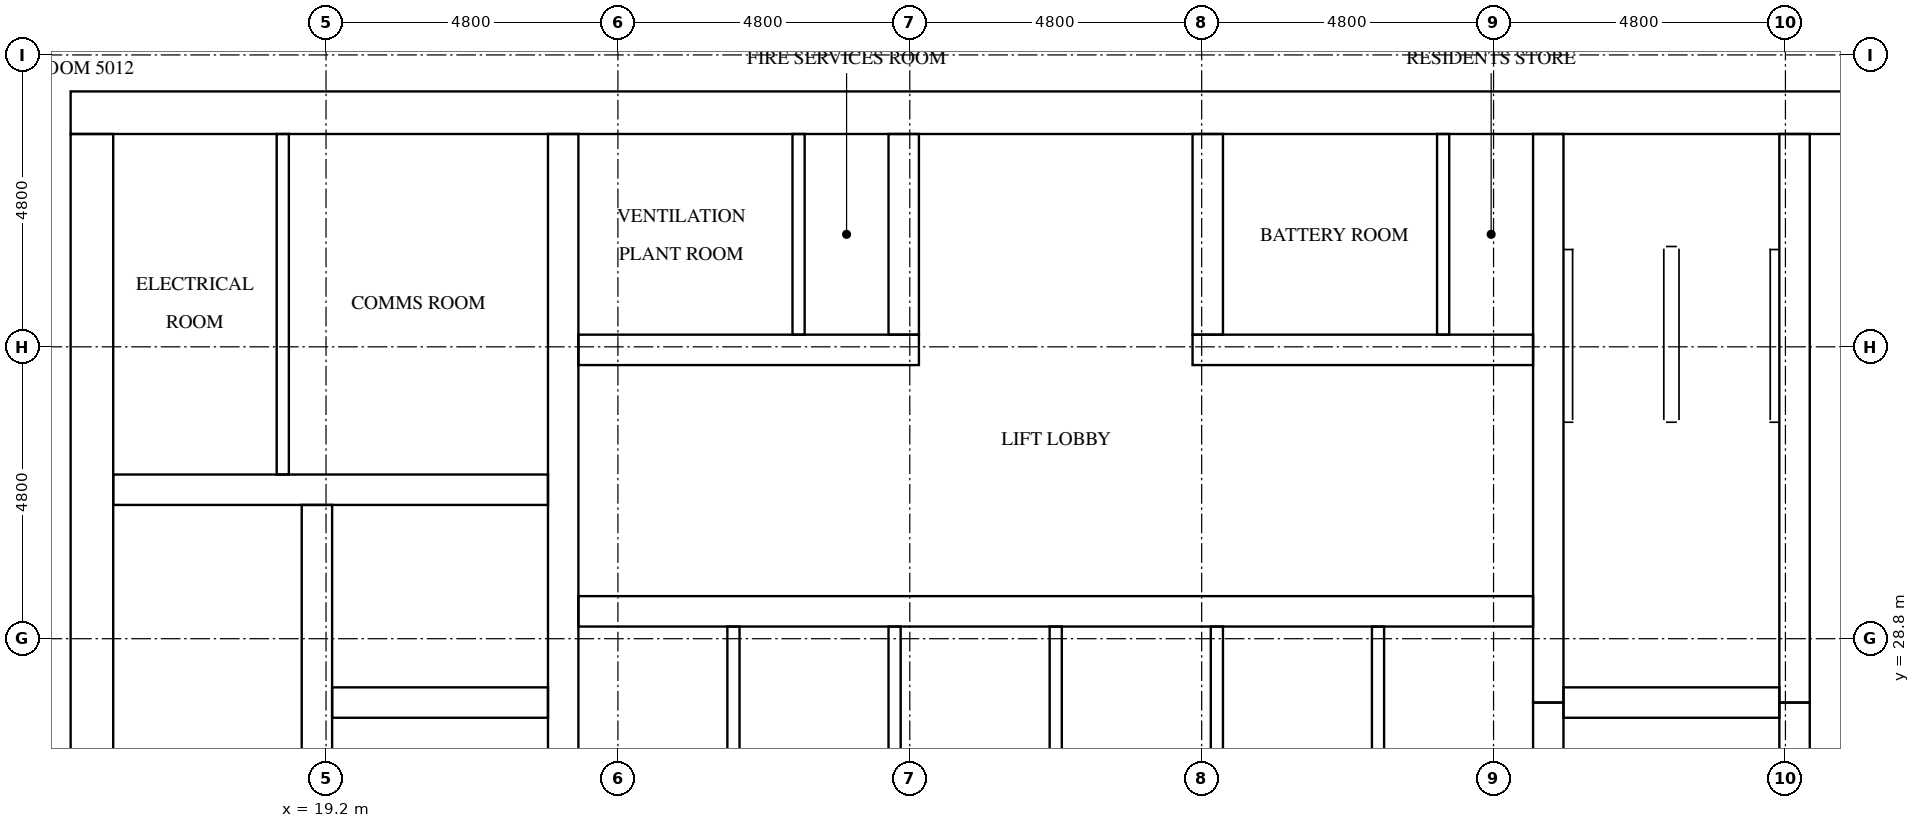
"""IFC4 building model, lengths in metres.
Left out: names, types, materials, properties, quantities, classifications, styles, units other than length and angle.
Written with IfcOpenShell. Run it as: python <this file> out.ifc"""

import sys

from ifc_helpers import new_model, si_unit, direction, frame, frame_2d, origin, place, context, subcontext, project, spatial, rectangle, extrude, element, fill, save


model = new_model("IFC4")
c1 = context("Model", 3, precision=1e-05, world=origin(), true_north=direction((0.0, 1.0)))
c2 = subcontext(c1, "Body", "Model", "MODEL_VIEW")
j1 = project(units=[si_unit("LENGTHUNIT", "METRE"), si_unit("PLANEANGLEUNIT", "RADIAN")], contexts=[c1])
p1 = place(None, origin())
s1 = spatial("IfcSite", under=j1, at=p1, CompositionType="ELEMENT")
p2 = place(p1, origin())
s2 = spatial("IfcBuilding", under=s1, at=p2, CompositionType="ELEMENT")
p3 = place(p2, frame((0.0, 0.0, 192.9)))
s3 = spatial("IfcBuildingStorey", under=s2, at=p3, CompositionType="ELEMENT", Elevation=192.9)
p4 = place(p3, frame((15.0, 37.45, 0.0), z_axis=(0.0, 0.0, 1.0), x_axis=(1.0, 0.0, 0.0)))
e1 = element("IfcWall", 1, at=p4, inside=s3, PredefinedType="SHEAR", context=c2, shape_type="SweptSolid", body=[
    extrude(rectangle(XDim=32.4, YDim=0.7, at=frame_2d((16.2, 0.0))), origin(), (0.0, 0.0, 1.0), 3.2),
])
p5 = place(p4, frame((15.3, 0.0, 0.0)))
e2 = element("IfcOpeningElement", 2, at=p5, cuts=e1, PredefinedType="OPENING", context=c2, shape_type="SweptSolid", body=[
    extrude(rectangle(XDim=1.8, YDim=2.1, at=frame_2d((0.9, 1.05))), frame((0.0, 0.36, 0.0), z_axis=(0.0, -1.0, 0.0), x_axis=(1.0, 0.0, 0.0)), (0.0, 0.0, 1.0), 0.72),
])
p6 = place(p4, frame((1.544, 0.0, 0.0)))
e3 = element("IfcOpeningElement", 3, at=p6, cuts=e1, PredefinedType="OPENING", context=c2, shape_type="SweptSolid", body=[
    extrude(rectangle(XDim=1.0, YDim=2.1, at=frame_2d((0.5, 1.05))), frame((0.0, 0.36, 0.0), z_axis=(0.0, -1.0, 0.0), x_axis=(1.0, 0.0, 0.0)), (0.0, 0.0, 1.0), 0.72),
])
p7 = place(p4, frame((5.219, 0.0, 0.0)))
e4 = element("IfcOpeningElement", 4, at=p7, cuts=e1, PredefinedType="OPENING", context=c2, shape_type="SweptSolid", body=[
    extrude(rectangle(XDim=1.0, YDim=2.1, at=frame_2d((0.5, 1.05))), frame((0.0, 0.36, 0.0), z_axis=(0.0, -1.0, 0.0), x_axis=(1.0, 0.0, 0.0)), (0.0, 0.0, 1.0), 0.72),
])
p8 = place(p3, frame((15.35, 15.7, 0.0), z_axis=(0.0, 0.0, 1.0), x_axis=(0.0, 1.0, 0.0)))
e5 = element("IfcWall", 5, at=p8, inside=s3, PredefinedType="SHEAR", context=c2, shape_type="SweptSolid", body=[
    extrude(rectangle(XDim=21.4, YDim=0.7, at=frame_2d((10.7, 0.0))), origin(), (0.0, 0.0, 1.0), 3.2),
])
p9 = place(p8, frame((5.06, 0.0, 0.0)))
e6 = element("IfcOpeningElement", 6, at=p9, cuts=e5, PredefinedType="OPENING", context=c2, shape_type="SweptSolid", body=[
    extrude(rectangle(XDim=1.2, YDim=2.1, at=frame_2d((0.6, 1.05))), frame((0.0, 0.36, 0.0), z_axis=(0.0, -1.0, 0.0), x_axis=(1.0, 0.0, 0.0)), (0.0, 0.0, 1.0), 0.72),
])
p10 = place(p3, frame((19.05, 15.7, 0.0), z_axis=(0.0, 0.0, 1.0), x_axis=(0.0, 1.0, 0.0)))
e7 = element("IfcWall", 7, at=p10, inside=s3, PredefinedType="SHEAR", context=c2, shape_type="SweptSolid", body=[
    extrude(rectangle(XDim=15.3, YDim=0.5, at=frame_2d((7.65, 0.0))), origin(), (0.0, 0.0, 1.0), 3.2),
])
p11 = place(p10, frame((9.75, 0.0, 0.0)))
e8 = element("IfcOpeningElement", 8, at=p11, cuts=e7, PredefinedType="OPENING", context=c2, shape_type="SweptSolid", body=[
    extrude(rectangle(XDim=1.1, YDim=2.1, at=frame_2d((0.55, 1.05))), frame((0.0, 0.26, 0.0), z_axis=(0.0, -1.0, 0.0), x_axis=(1.0, 0.0, 0.0)), (0.0, 0.0, 1.0), 0.52),
])
p12 = place(p10, frame((13.25, 0.0, 0.0)))
e9 = element("IfcOpeningElement", 9, at=p12, cuts=e7, PredefinedType="OPENING", context=c2, shape_type="SweptSolid", body=[
    extrude(rectangle(XDim=1.1, YDim=2.1, at=frame_2d((0.55, 1.05))), frame((0.0, 0.26, 0.0), z_axis=(0.0, -1.0, 0.0), x_axis=(1.0, 0.0, 0.0)), (0.0, 0.0, 1.0), 0.52),
])
p13 = place(p10, frame((0.5, 0.0, 0.0)))
e10 = element("IfcOpeningElement", 10, at=p13, cuts=e7, PredefinedType="OPENING", context=c2, shape_type="SweptSolid", body=[
    extrude(rectangle(XDim=1.2, YDim=2.1, at=frame_2d((0.6, 1.05))), frame((0.0, 0.26, 0.0), z_axis=(0.0, -1.0, 0.0), x_axis=(1.0, 0.0, 0.0)), (0.0, 0.0, 1.0), 0.52),
])
p14 = place(p3, frame((23.1, 15.7, 0.0), z_axis=(0.0, 0.0, 1.0), x_axis=(0.0, 1.0, 0.0)))
e11 = element("IfcWall", 11, at=p14, inside=s3, PredefinedType="SHEAR", context=c2, shape_type="SweptSolid", body=[
    extrude(rectangle(XDim=21.4, YDim=0.5, at=frame_2d((10.7, 0.0))), origin(), (0.0, 0.0, 1.0), 3.2),
])
p15 = place(p3, frame((39.3, 24.25, 0.0), z_axis=(0.0, 0.0, 1.0), x_axis=(0.0, 1.0, 0.0)))
e12 = element("IfcWall", 12, at=p15, inside=s3, PredefinedType="SHEAR", context=c2, shape_type="SweptSolid", body=[
    extrude(rectangle(XDim=3.5, YDim=0.5, at=frame_2d((1.75, 0.0))), origin(), (0.0, 0.0, 1.0), 3.2),
])
p16 = place(p3, frame((39.3, 27.75, 0.0), z_axis=(0.0, 0.0, 1.0), x_axis=(0.0, 1.0, 0.0)))
e13 = element("IfcWall", 13, at=p16, inside=s3, PredefinedType="SHEAR", context=c2, shape_type="SweptSolid", body=[
    extrude(rectangle(XDim=9.35, YDim=0.5, at=frame_2d((4.675, 0.0))), origin(), (0.0, 0.0, 1.0), 3.2),
])
p17 = place(p3, frame((43.35, 24.25, 0.0), z_axis=(0.0, 0.0, 1.0), x_axis=(0.0, 1.0, 0.0)))
e14 = element("IfcWall", 14, at=p17, inside=s3, PredefinedType="SHEAR", context=c2, shape_type="SweptSolid", body=[
    extrude(rectangle(XDim=3.5, YDim=0.5, at=frame_2d((1.75, 0.0))), origin(), (0.0, 0.0, 1.0), 3.2),
])
p18 = place(p17, frame((1.2, 0.0, 0.0)))
e15 = element("IfcOpeningElement", 15, at=p18, cuts=e14, PredefinedType="OPENING", context=c2, shape_type="SweptSolid", body=[
    extrude(rectangle(XDim=1.1, YDim=2.1, at=frame_2d((0.55, 1.05))), frame((0.0, 0.26, 0.0), z_axis=(0.0, -1.0, 0.0), x_axis=(1.0, 0.0, 0.0)), (0.0, 0.0, 1.0), 0.52),
])
p19 = place(p3, frame((43.35, 27.75, 0.0), z_axis=(0.0, 0.0, 1.0), x_axis=(0.0, 1.0, 0.0)))
e16 = element("IfcWall", 16, at=p19, inside=s3, PredefinedType="SHEAR", context=c2, shape_type="SweptSolid", body=[
    extrude(rectangle(XDim=9.35, YDim=0.5, at=frame_2d((4.675, 0.0))), origin(), (0.0, 0.0, 1.0), 3.2),
])
p20 = place(p19, frame((7.65, 0.0, 0.0)))
e17 = element("IfcOpeningElement", 17, at=p20, cuts=e16, PredefinedType="OPENING", context=c2, shape_type="SweptSolid", body=[
    extrude(rectangle(XDim=1.2, YDim=2.1, at=frame_2d((0.6, 1.05))), frame((0.0, 0.26, 0.0), z_axis=(0.0, -1.0, 0.0), x_axis=(1.0, 0.0, 0.0)), (0.0, 0.0, 1.0), 0.52),
])
p21 = place(p3, frame((19.3, 27.75, 0.0), z_axis=(0.0, 0.0, 1.0), x_axis=(1.0, 0.0, 0.0)))
e18 = element("IfcWall", 18, at=p21, inside=s3, PredefinedType="SHEAR", context=c2, shape_type="SweptSolid", body=[
    extrude(rectangle(XDim=3.55, YDim=0.5, at=frame_2d((1.775, 0.0))), origin(), (0.0, 0.0, 1.0), 3.2),
])
p22 = place(p3, frame((15.7, 31.25, 0.0), z_axis=(0.0, 0.0, 1.0), x_axis=(1.0, 0.0, 0.0)))
e19 = element("IfcWall", 19, at=p22, inside=s3, PredefinedType="SHEAR", context=c2, shape_type="SweptSolid", body=[
    extrude(rectangle(XDim=7.15, YDim=0.5, at=frame_2d((3.575, 0.0))), origin(), (0.0, 0.0, 1.0), 3.2),
])
p23 = place(p3, frame((39.55, 27.75, 0.0), z_axis=(0.0, 0.0, 1.0), x_axis=(1.0, 0.0, 0.0)))
e20 = element("IfcWall", 20, at=p23, inside=s3, PredefinedType="SHEAR", context=c2, shape_type="SweptSolid", body=[
    extrude(rectangle(XDim=3.55, YDim=0.5, at=frame_2d((1.775, 0.0))), origin(), (0.0, 0.0, 1.0), 3.2),
])
p24 = place(p3, frame((23.35, 29.25, 0.0), z_axis=(0.0, 0.0, 1.0), x_axis=(1.0, 0.0, 0.0)))
e21 = element("IfcWall", 21, at=p24, inside=s3, PredefinedType="SHEAR", context=c2, shape_type="SweptSolid", body=[
    extrude(rectangle(XDim=15.7, YDim=0.5, at=frame_2d((7.85, 0.0))), origin(), (0.0, 0.0, 1.0), 3.2),
])
p25 = place(p24, frame((0.675, 0.0, 0.0)))
e22 = element("IfcOpeningElement", 22, at=p25, cuts=e21, PredefinedType="OPENING", context=c2, shape_type="SweptSolid", body=[
    extrude(rectangle(XDim=1.1, YDim=2.1, at=frame_2d((0.55, 1.05))), frame((0.0, 0.26, 0.0), z_axis=(0.0, -1.0, 0.0), x_axis=(1.0, 0.0, 0.0)), (0.0, 0.0, 1.0), 0.52),
])
p26 = place(p24, frame((3.325, 0.0, 0.0)))
e23 = element("IfcOpeningElement", 23, at=p26, cuts=e21, PredefinedType="OPENING", context=c2, shape_type="SweptSolid", body=[
    extrude(rectangle(XDim=1.1, YDim=2.1, at=frame_2d((0.55, 1.05))), frame((0.0, 0.26, 0.0), z_axis=(0.0, -1.0, 0.0), x_axis=(1.0, 0.0, 0.0)), (0.0, 0.0, 1.0), 0.52),
])
p27 = place(p24, frame((5.975, 0.0, 0.0)))
e24 = element("IfcOpeningElement", 24, at=p27, cuts=e21, PredefinedType="OPENING", context=c2, shape_type="SweptSolid", body=[
    extrude(rectangle(XDim=1.1, YDim=2.1, at=frame_2d((0.55, 1.05))), frame((0.0, 0.26, 0.0), z_axis=(0.0, -1.0, 0.0), x_axis=(1.0, 0.0, 0.0)), (0.0, 0.0, 1.0), 0.52),
])
p28 = place(p24, frame((8.625, 0.0, 0.0)))
e25 = element("IfcOpeningElement", 25, at=p28, cuts=e21, PredefinedType="OPENING", context=c2, shape_type="SweptSolid", body=[
    extrude(rectangle(XDim=1.1, YDim=2.1, at=frame_2d((0.55, 1.05))), frame((0.0, 0.26, 0.0), z_axis=(0.0, -1.0, 0.0), x_axis=(1.0, 0.0, 0.0)), (0.0, 0.0, 1.0), 0.52),
])
p29 = place(p24, frame((11.275, 0.0, 0.0)))
e26 = element("IfcOpeningElement", 26, at=p29, cuts=e21, PredefinedType="OPENING", context=c2, shape_type="SweptSolid", body=[
    extrude(rectangle(XDim=1.1, YDim=2.1, at=frame_2d((0.55, 1.05))), frame((0.0, 0.26, 0.0), z_axis=(0.0, -1.0, 0.0), x_axis=(1.0, 0.0, 0.0)), (0.0, 0.0, 1.0), 0.52),
])
p30 = place(p24, frame((13.925, 0.0, 0.0)))
e27 = element("IfcOpeningElement", 27, at=p30, cuts=e21, PredefinedType="OPENING", context=c2, shape_type="SweptSolid", body=[
    extrude(rectangle(XDim=1.1, YDim=2.1, at=frame_2d((0.55, 1.05))), frame((0.0, 0.26, 0.0), z_axis=(0.0, -1.0, 0.0), x_axis=(1.0, 0.0, 0.0)), (0.0, 0.0, 1.0), 0.52),
])
p31 = place(p3, frame((23.35, 33.55, 0.0), z_axis=(0.0, 0.0, 1.0), x_axis=(1.0, 0.0, 0.0)))
e28 = element("IfcWall", 28, at=p31, inside=s3, PredefinedType="SHEAR", context=c2, shape_type="SweptSolid", body=[
    extrude(rectangle(XDim=5.6, YDim=0.5, at=frame_2d((2.8, 0.0))), origin(), (0.0, 0.0, 1.0), 3.2),
])
p32 = place(p31, frame((1.26, 0.0, 0.0)))
e29 = element("IfcOpeningElement", 29, at=p32, cuts=e28, PredefinedType="OPENING", context=c2, shape_type="SweptSolid", body=[
    extrude(rectangle(XDim=1.0, YDim=2.1, at=frame_2d((0.5, 1.05))), frame((0.0, 0.26, 0.0), z_axis=(0.0, -1.0, 0.0), x_axis=(1.0, 0.0, 0.0)), (0.0, 0.0, 1.0), 0.52),
])
p33 = place(p31, frame((3.91, 0.0, 0.0)))
e30 = element("IfcOpeningElement", 30, at=p33, cuts=e28, PredefinedType="OPENING", context=c2, shape_type="SweptSolid", body=[
    extrude(rectangle(XDim=1.0, YDim=2.1, at=frame_2d((0.5, 1.05))), frame((0.0, 0.26, 0.0), z_axis=(0.0, -1.0, 0.0), x_axis=(1.0, 0.0, 0.0)), (0.0, 0.0, 1.0), 0.52),
])
p34 = place(p3, frame((33.45, 33.55, 0.0), z_axis=(0.0, 0.0, 1.0), x_axis=(1.0, 0.0, 0.0)))
e31 = element("IfcWall", 31, at=p34, inside=s3, PredefinedType="SHEAR", context=c2, shape_type="SweptSolid", body=[
    extrude(rectangle(XDim=5.6, YDim=0.5, at=frame_2d((2.8, 0.0))), origin(), (0.0, 0.0, 1.0), 3.2),
])
p35 = place(p34, frame((1.76, 0.0, 0.0)))
e32 = element("IfcOpeningElement", 32, at=p35, cuts=e31, PredefinedType="OPENING", context=c2, shape_type="SweptSolid", body=[
    extrude(rectangle(XDim=1.0, YDim=2.1, at=frame_2d((0.5, 1.05))), frame((0.0, 0.26, 0.0), z_axis=(0.0, -1.0, 0.0), x_axis=(1.0, 0.0, 0.0)), (0.0, 0.0, 1.0), 0.52),
])
p36 = place(p34, frame((4.41, 0.0, 0.0)))
e33 = element("IfcOpeningElement", 33, at=p36, cuts=e31, PredefinedType="OPENING", context=c2, shape_type="SweptSolid", body=[
    extrude(rectangle(XDim=1.0, YDim=2.1, at=frame_2d((0.5, 1.05))), frame((0.0, 0.26, 0.0), z_axis=(0.0, -1.0, 0.0), x_axis=(1.0, 0.0, 0.0)), (0.0, 0.0, 1.0), 0.52),
])
for number, where, z_axis, x_axis in (
    (34, (28.7, 33.8, 0.0), (0.0, 0.0, 1.0), (0.0, 1.0, 0.0)),
    (35, (33.7, 33.8, 0.0), (0.0, 0.0, 1.0), (0.0, 1.0, 0.0)),
):
    element("IfcWall", number, at=place(p3, frame(where, z_axis=z_axis, x_axis=x_axis)), inside=s3, PredefinedType="SHEAR", context=c2, shape_type="SweptSolid", body=[
        extrude(rectangle(XDim=3.3, YDim=0.5, at=frame_2d((1.65, 0.0))), origin(), (0.0, 0.0, 1.0), 3.2),
    ])
for number, where, z_axis, x_axis in (
    (36, (25.9, 26.4, 0.0), (0.0, 0.0, 1.0), (0.0, 1.0, 0.0)),
    (37, (28.55, 26.4, 0.0), (0.0, 0.0, 1.0), (0.0, 1.0, 0.0)),
    (38, (31.2, 26.4, 0.0), (0.0, 0.0, 1.0), (0.0, 1.0, 0.0)),
    (39, (33.85, 26.4, 0.0), (0.0, 0.0, 1.0), (0.0, 1.0, 0.0)),
    (40, (36.5, 26.4, 0.0), (0.0, 0.0, 1.0), (0.0, 1.0, 0.0)),
):
    element("IfcWall", number, at=place(p3, frame(where, z_axis=z_axis, x_axis=x_axis)), inside=s3, PredefinedType="SOLIDWALL", context=c2, shape_type="SweptSolid", body=[
        extrude(rectangle(XDim=2.6, YDim=0.2, at=frame_2d((1.3, 0.0))), origin(), (0.0, 0.0, 1.0), 3.2),
    ])
p37 = place(p3, frame((18.489, 31.5, 0.0), z_axis=(0.0, 0.0, 1.0), x_axis=(0.0, 1.0, 0.0)))
e41 = element("IfcWall", 41, at=p37, inside=s3, PredefinedType="PARTITIONING", context=c2, shape_type="SweptSolid", body=[
    extrude(rectangle(XDim=5.6, YDim=0.2, at=frame_2d((2.8, 0.0))), origin(), (0.0, 0.0, 1.0), 3.2),
])
for number, where, z_axis, x_axis in (
    (42, (26.971, 33.8, 0.0), (0.0, 0.0, 1.0), (0.0, 1.0, 0.0)),
    (43, (37.571, 33.8, 0.0), (0.0, 0.0, 1.0), (0.0, 1.0, 0.0)),
):
    element("IfcWall", number, at=place(p3, frame(where, z_axis=z_axis, x_axis=x_axis)), inside=s3, PredefinedType="PARTITIONING", context=c2, shape_type="SweptSolid", body=[
        extrude(rectangle(XDim=3.3, YDim=0.2, at=frame_2d((1.65, 0.0))), origin(), (0.0, 0.0, 1.0), 3.2),
    ])
p38 = place(p25, origin())
e44 = element("IfcDoor", 44, at=p38, inside=s3, OperationType="DOUBLE_DOOR_SLIDING", PredefinedType="DOOR", context=c2, shape_type="SweptSolid", body=[
    extrude(rectangle(XDim=1.1, YDim=2.1, at=frame_2d((0.55, 1.05))), frame((0.0, 0.025, 0.0), z_axis=(0.0, -1.0, 0.0), x_axis=(1.0, 0.0, 0.0)), (0.0, 0.0, 1.0), 0.05),
])
fill(e22, e44)
p39 = place(p26, origin())
e45 = element("IfcDoor", 45, at=p39, inside=s3, OperationType="DOUBLE_DOOR_SLIDING", PredefinedType="DOOR", context=c2, shape_type="SweptSolid", body=[
    extrude(rectangle(XDim=1.1, YDim=2.1, at=frame_2d((0.55, 1.05))), frame((0.0, 0.025, 0.0), z_axis=(0.0, -1.0, 0.0), x_axis=(1.0, 0.0, 0.0)), (0.0, 0.0, 1.0), 0.05),
])
fill(e23, e45)
p40 = place(p27, origin())
e46 = element("IfcDoor", 46, at=p40, inside=s3, OperationType="DOUBLE_DOOR_SLIDING", PredefinedType="DOOR", context=c2, shape_type="SweptSolid", body=[
    extrude(rectangle(XDim=1.1, YDim=2.1, at=frame_2d((0.55, 1.05))), frame((0.0, 0.025, 0.0), z_axis=(0.0, -1.0, 0.0), x_axis=(1.0, 0.0, 0.0)), (0.0, 0.0, 1.0), 0.05),
])
fill(e24, e46)
p41 = place(p28, origin())
e47 = element("IfcDoor", 47, at=p41, inside=s3, OperationType="DOUBLE_DOOR_SLIDING", PredefinedType="DOOR", context=c2, shape_type="SweptSolid", body=[
    extrude(rectangle(XDim=1.1, YDim=2.1, at=frame_2d((0.55, 1.05))), frame((0.0, 0.025, 0.0), z_axis=(0.0, -1.0, 0.0), x_axis=(1.0, 0.0, 0.0)), (0.0, 0.0, 1.0), 0.05),
])
fill(e25, e47)
p42 = place(p29, origin())
e48 = element("IfcDoor", 48, at=p42, inside=s3, OperationType="DOUBLE_DOOR_SLIDING", PredefinedType="DOOR", context=c2, shape_type="SweptSolid", body=[
    extrude(rectangle(XDim=1.1, YDim=2.1, at=frame_2d((0.55, 1.05))), frame((0.0, 0.025, 0.0), z_axis=(0.0, -1.0, 0.0), x_axis=(1.0, 0.0, 0.0)), (0.0, 0.0, 1.0), 0.05),
])
fill(e26, e48)
p43 = place(p30, origin())
e49 = element("IfcDoor", 49, at=p43, inside=s3, OperationType="DOUBLE_DOOR_SLIDING", PredefinedType="DOOR", context=c2, shape_type="SweptSolid", body=[
    extrude(rectangle(XDim=1.1, YDim=2.1, at=frame_2d((0.55, 1.05))), frame((0.0, 0.025, 0.0), z_axis=(0.0, -1.0, 0.0), x_axis=(1.0, 0.0, 0.0)), (0.0, 0.0, 1.0), 0.05),
])
fill(e27, e49)
p44 = place(p12, origin())
e50 = element("IfcDoor", 50, at=p44, inside=s3, OperationType="DOUBLE_DOOR_SLIDING", PredefinedType="DOOR", context=c2, shape_type="SweptSolid", body=[
    extrude(rectangle(XDim=1.1, YDim=2.1, at=frame_2d((0.55, 1.05))), frame((0.0, 0.025, 0.0), z_axis=(0.0, -1.0, 0.0), x_axis=(1.0, 0.0, 0.0)), (0.0, 0.0, 1.0), 0.05),
])
fill(e9, e50)
p45 = place(p20, origin())
e51 = element("IfcDoor", 51, at=p45, inside=s3, OperationType="SINGLE_SWING_RIGHT", PredefinedType="DOOR", context=c2, shape_type="SweptSolid", body=[
    extrude(rectangle(XDim=1.2, YDim=2.1, at=frame_2d((0.6, 1.05))), frame((0.0, 0.025, 0.0), z_axis=(0.0, -1.0, 0.0), x_axis=(1.0, 0.0, 0.0)), (0.0, 0.0, 1.0), 0.05),
])
fill(e17, e51)
p46 = place(p5, origin())
e52 = element("IfcDoor", 52, at=p46, inside=s3, OperationType="DOUBLE_DOOR_SINGLE_SWING", PredefinedType="DOOR", context=c2, shape_type="SweptSolid", body=[
    extrude(rectangle(XDim=1.8, YDim=2.1, at=frame_2d((0.9, 1.05))), frame((0.0, 0.025, 0.0), z_axis=(0.0, -1.0, 0.0), x_axis=(1.0, 0.0, 0.0)), (0.0, 0.0, 1.0), 0.05),
])
fill(e2, e52)
p47 = place(p6, origin())
e53 = element("IfcDoor", 53, at=p47, inside=s3, OperationType="SINGLE_SWING_LEFT", PredefinedType="DOOR", context=c2, shape_type="SweptSolid", body=[
    extrude(rectangle(XDim=1.0, YDim=2.1, at=frame_2d((0.5, 1.05))), frame((0.0, 0.025, 0.0), z_axis=(0.0, -1.0, 0.0), x_axis=(1.0, 0.0, 0.0)), (0.0, 0.0, 1.0), 0.05),
])
fill(e3, e53)
p48 = place(p7, origin())
e54 = element("IfcDoor", 54, at=p48, inside=s3, OperationType="SINGLE_SWING_RIGHT", PredefinedType="DOOR", context=c2, shape_type="SweptSolid", body=[
    extrude(rectangle(XDim=1.0, YDim=2.1, at=frame_2d((0.5, 1.05))), frame((0.0, 0.025, 0.0), z_axis=(0.0, -1.0, 0.0), x_axis=(1.0, 0.0, 0.0)), (0.0, 0.0, 1.0), 0.05),
])
fill(e4, e54)
p49 = place(p32, frame((1.0, 0.0, 0.0), z_axis=(0.0, 0.0, 1.0), x_axis=(-1.0, 0.0, 0.0)))
e55 = element("IfcDoor", 55, at=p49, inside=s3, OperationType="SINGLE_SWING_RIGHT", PredefinedType="DOOR", context=c2, shape_type="SweptSolid", body=[
    extrude(rectangle(XDim=1.0, YDim=2.1, at=frame_2d((0.5, 1.05))), frame((0.0, 0.025, 0.0), z_axis=(0.0, -1.0, 0.0), x_axis=(1.0, 0.0, 0.0)), (0.0, 0.0, 1.0), 0.05),
])
fill(e29, e55)
p50 = place(p33, frame((1.0, 0.0, 0.0), z_axis=(0.0, 0.0, 1.0), x_axis=(-1.0, 0.0, 0.0)))
e56 = element("IfcDoor", 56, at=p50, inside=s3, OperationType="SINGLE_SWING_LEFT", PredefinedType="DOOR", context=c2, shape_type="SweptSolid", body=[
    extrude(rectangle(XDim=1.0, YDim=2.1, at=frame_2d((0.5, 1.05))), frame((0.0, 0.025, 0.0), z_axis=(0.0, -1.0, 0.0), x_axis=(1.0, 0.0, 0.0)), (0.0, 0.0, 1.0), 0.05),
])
fill(e30, e56)
p51 = place(p35, frame((1.0, 0.0, 0.0), z_axis=(0.0, 0.0, 1.0), x_axis=(-1.0, 0.0, 0.0)))
e57 = element("IfcDoor", 57, at=p51, inside=s3, OperationType="SINGLE_SWING_RIGHT", PredefinedType="DOOR", context=c2, shape_type="SweptSolid", body=[
    extrude(rectangle(XDim=1.0, YDim=2.1, at=frame_2d((0.5, 1.05))), frame((0.0, 0.025, 0.0), z_axis=(0.0, -1.0, 0.0), x_axis=(1.0, 0.0, 0.0)), (0.0, 0.0, 1.0), 0.05),
])
fill(e32, e57)
p52 = place(p36, frame((1.0, 0.0, 0.0), z_axis=(0.0, 0.0, 1.0), x_axis=(-1.0, 0.0, 0.0)))
e58 = element("IfcDoor", 58, at=p52, inside=s3, OperationType="SINGLE_SWING_LEFT", PredefinedType="DOOR", context=c2, shape_type="SweptSolid", body=[
    extrude(rectangle(XDim=1.0, YDim=2.1, at=frame_2d((0.5, 1.05))), frame((0.0, 0.025, 0.0), z_axis=(0.0, -1.0, 0.0), x_axis=(1.0, 0.0, 0.0)), (0.0, 0.0, 1.0), 0.05),
])
fill(e33, e58)
save(model, sys.argv[1])
